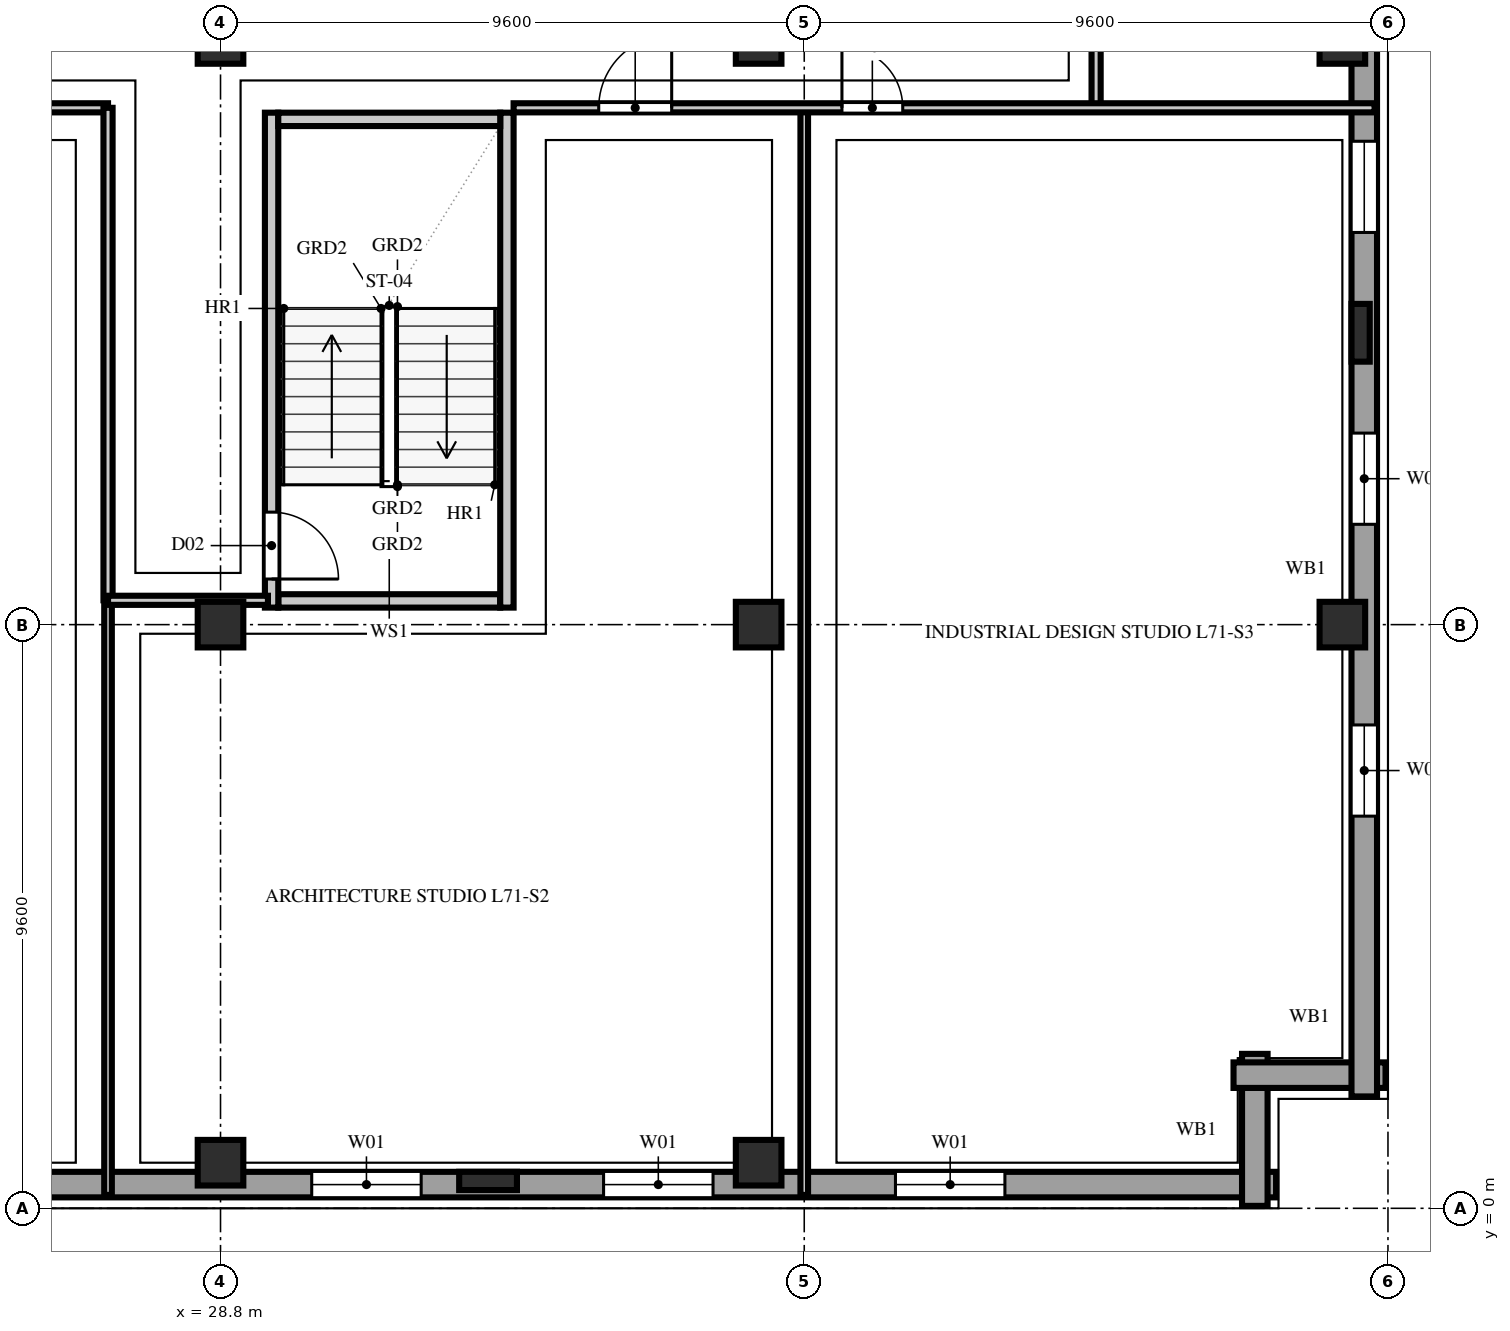
"""IFC4 building model, lengths in metres.
Left out: names, types, materials, properties, quantities, classifications, styles, units other than length and angle.
Written with IfcOpenShell. Run it as: python <this file> out.ifc"""

import sys

from ifc_helpers import new_model, si_unit, direction, frame, frame_2d, origin, origin_2d, place, context, subcontext, project, spatial, rectangle, extrude, element, fill, save


model = new_model("IFC4")
c1 = context("Model", 3, precision=1e-05, world=origin(), true_north=direction((0.0, 1.0)))
c2 = subcontext(c1, "Body", "Model", "MODEL_VIEW")
j1 = project(units=[si_unit("LENGTHUNIT", "METRE"), si_unit("PLANEANGLEUNIT", "RADIAN")], contexts=[c1])
p1 = place(None, origin())
s1 = spatial("IfcSite", under=j1, at=p1, CompositionType="ELEMENT")
p2 = place(p1, origin())
s2 = spatial("IfcBuilding", under=s1, at=p2, CompositionType="ELEMENT")
p3 = place(p2, frame((0.0, 0.0, 281.0)))
s3 = spatial("IfcBuildingStorey", under=s2, at=p3, CompositionType="ELEMENT", Elevation=281.0)
for number, where, z_axis, x_axis in (
    (1, (28.8, 0.75, 0.0), (0.0, 0.0, 1.0), (1.0, 0.0, 0.0)),
    (2, (28.8, 9.6, 0.0), (0.0, 0.0, 1.0), (1.0, 0.0, 0.0)),
    (3, (28.8, 19.2, 0.0), (0.0, 0.0, 1.0), (1.0, 0.0, 0.0)),
    (4, (37.65, 0.75, 0.0), (0.0, 0.0, 1.0), (1.0, 0.0, 0.0)),
    (5, (37.65, 9.6, 0.0), (0.0, 0.0, 1.0), (1.0, 0.0, 0.0)),
    (6, (37.65, 19.2, 0.0), (0.0, 0.0, 1.0), (1.0, 0.0, 0.0)),
    (7, (47.25, 9.6, 0.0), (0.0, 0.0, 1.0), (1.0, 0.0, 0.0)),
    (8, (47.25, 19.2, 0.0), (0.0, 0.0, 1.0), (1.0, 0.0, 0.0)),
):
    element("IfcColumn", number, at=place(p3, frame(where, z_axis=z_axis, x_axis=x_axis)), inside=s3, PredefinedType="COLUMN", context=c2, shape_type="SweptSolid", body=[
        extrude(rectangle(XDim=0.75, YDim=0.75, at=origin_2d()), origin(), (0.0, 0.0, 1.0), 3.8),
    ])
for number, where, z_axis, x_axis in (
    (9, (33.2, 0.45, 0.0), (0.0, 0.0, 1.0), (1.0, 0.0, 0.0)),
    (10, (47.55, 14.4, 0.0), (0.0, 0.0, 1.0), (0.0, 1.0, 0.0)),
):
    element("IfcColumn", number, at=place(p3, frame(where, z_axis=z_axis, x_axis=x_axis)), inside=s3, PredefinedType="PILASTER", context=c2, shape_type="SweptSolid", body=[
        extrude(rectangle(XDim=0.95, YDim=0.3, at=origin_2d()), origin(), (0.0, 0.0, 1.0), 3.8),
    ])
p4 = place(p3, frame((1.84, 0.39, 0.0), z_axis=(0.0, 0.0, 1.0), x_axis=(1.0, 0.0, 0.0)))
e11 = element("IfcWall", 11, at=p4, inside=s3, PredefinedType="SOLIDWALL", context=c2, shape_type="SweptSolid", body=[
    extrude(rectangle(XDim=44.32, YDim=0.42, at=frame_2d((22.16, 0.0))), origin(), (0.0, 0.0, 1.0), 3.54),
])
p5 = place(p4, frame((4.46, 0.0, 0.85)))
e12 = element("IfcOpeningElement", 12, at=p5, cuts=e11, PredefinedType="OPENING", context=c2, shape_type="SweptSolid", body=[
    extrude(rectangle(XDim=1.8, YDim=1.85, at=frame_2d((0.9, 0.925))), frame((0.0, 0.222, 0.0), z_axis=(0.0, -1.0, 0.0), x_axis=(1.0, 0.0, 0.0)), (0.0, 0.0, 1.0), 0.444),
])
p6 = place(p4, frame((9.26, 0.0, 0.85)))
e13 = element("IfcOpeningElement", 13, at=p6, cuts=e11, PredefinedType="OPENING", context=c2, shape_type="SweptSolid", body=[
    extrude(rectangle(XDim=1.8, YDim=1.85, at=frame_2d((0.9, 0.925))), frame((0.0, 0.222, 0.0), z_axis=(0.0, -1.0, 0.0), x_axis=(1.0, 0.0, 0.0)), (0.0, 0.0, 1.0), 0.444),
])
p7 = place(p4, frame((18.86, 0.0, 0.85)))
e14 = element("IfcOpeningElement", 14, at=p7, cuts=e11, PredefinedType="OPENING", context=c2, shape_type="SweptSolid", body=[
    extrude(rectangle(XDim=1.8, YDim=1.85, at=frame_2d((0.9, 0.925))), frame((0.0, 0.222, 0.0), z_axis=(0.0, -1.0, 0.0), x_axis=(1.0, 0.0, 0.0)), (0.0, 0.0, 1.0), 0.444),
])
p8 = place(p4, frame((28.46, 0.0, 0.85)))
e15 = element("IfcOpeningElement", 15, at=p8, cuts=e11, PredefinedType="OPENING", context=c2, shape_type="SweptSolid", body=[
    extrude(rectangle(XDim=1.8, YDim=1.85, at=frame_2d((0.9, 0.925))), frame((0.0, 0.222, 0.0), z_axis=(0.0, -1.0, 0.0), x_axis=(1.0, 0.0, 0.0)), (0.0, 0.0, 1.0), 0.444),
])
p9 = place(p4, frame((33.26, 0.0, 0.85)))
e16 = element("IfcOpeningElement", 16, at=p9, cuts=e11, PredefinedType="OPENING", context=c2, shape_type="SweptSolid", body=[
    extrude(rectangle(XDim=1.8, YDim=1.85, at=frame_2d((0.9, 0.925))), frame((0.0, 0.222, 0.0), z_axis=(0.0, -1.0, 0.0), x_axis=(1.0, 0.0, 0.0)), (0.0, 0.0, 1.0), 0.444),
])
p10 = place(p4, frame((38.06, 0.0, 0.85)))
e17 = element("IfcOpeningElement", 17, at=p10, cuts=e11, PredefinedType="OPENING", context=c2, shape_type="SweptSolid", body=[
    extrude(rectangle(XDim=1.8, YDim=1.85, at=frame_2d((0.9, 0.925))), frame((0.0, 0.222, 0.0), z_axis=(0.0, -1.0, 0.0), x_axis=(1.0, 0.0, 0.0)), (0.0, 0.0, 1.0), 0.444),
])
for number, where, z_axis, x_axis in (
    (18, (45.81, 0.04, 0.0), (0.0, 0.0, 1.0), (0.0, 1.0, 0.0)),
    (19, (45.46, 2.19, 0.0), (0.0, 0.0, 1.0), (1.0, 0.0, 0.0)),
):
    element("IfcWall", number, at=place(p3, frame(where, z_axis=z_axis, x_axis=x_axis)), inside=s3, PredefinedType="SOLIDWALL", context=c2, shape_type="SweptSolid", body=[
        extrude(rectangle(XDim=2.5, YDim=0.42, at=frame_2d((1.25, 0.0))), origin(), (0.0, 0.0, 1.0), 3.54),
    ])
p11 = place(p3, frame((47.61, 1.84, 0.0), z_axis=(0.0, 0.0, 1.0), x_axis=(0.0, 1.0, 0.0)))
e20 = element("IfcWall", 20, at=p11, inside=s3, PredefinedType="SOLIDWALL", context=c2, shape_type="SweptSolid", body=[
    extrude(rectangle(XDim=17.36, YDim=0.42, at=frame_2d((8.68, 0.0))), origin(), (0.0, 0.0, 1.0), 3.54),
])
p12 = place(p11, frame((4.61, 0.0, 0.85)))
e21 = element("IfcOpeningElement", 21, at=p12, cuts=e20, PredefinedType="OPENING", context=c2, shape_type="SweptSolid", body=[
    extrude(rectangle(XDim=1.5, YDim=1.85, at=frame_2d((0.75, 0.925))), frame((0.0, 0.222, 0.0), z_axis=(0.0, -1.0, 0.0), x_axis=(1.0, 0.0, 0.0)), (0.0, 0.0, 1.0), 0.444),
])
p13 = place(p11, frame((9.41, 0.0, 0.85)))
e22 = element("IfcOpeningElement", 22, at=p13, cuts=e20, PredefinedType="OPENING", context=c2, shape_type="SweptSolid", body=[
    extrude(rectangle(XDim=1.5, YDim=1.85, at=frame_2d((0.75, 0.925))), frame((0.0, 0.222, 0.0), z_axis=(0.0, -1.0, 0.0), x_axis=(1.0, 0.0, 0.0)), (0.0, 0.0, 1.0), 0.444),
])
p14 = place(p11, frame((14.21, 0.0, 0.85)))
e23 = element("IfcOpeningElement", 23, at=p14, cuts=e20, PredefinedType="OPENING", context=c2, shape_type="SweptSolid", body=[
    extrude(rectangle(XDim=1.5, YDim=1.85, at=frame_2d((0.75, 0.925))), frame((0.0, 0.222, 0.0), z_axis=(0.0, -1.0, 0.0), x_axis=(1.0, 0.0, 0.0)), (0.0, 0.0, 1.0), 0.444),
])
p15 = place(p3, frame((29.75, 9.99, 0.0), z_axis=(0.0, 0.0, 1.0), x_axis=(1.0, 0.0, 0.0)))
e24 = element("IfcWall", 24, at=p15, inside=s3, PredefinedType="SOLIDWALL", context=c2, shape_type="SweptSolid", body=[
    extrude(rectangle(XDim=3.65, YDim=0.22, at=frame_2d((1.825, 0.0))), origin(), (0.0, 0.0, 1.0), 3.54),
])
p16 = place(p3, frame((29.64, 9.88, 0.0), z_axis=(0.0, 0.0, 1.0), x_axis=(0.0, 1.0, 0.0)))
e25 = element("IfcWall", 25, at=p16, inside=s3, PredefinedType="SOLIDWALL", context=c2, shape_type="SweptSolid", body=[
    extrude(rectangle(XDim=8.14, YDim=0.22, at=frame_2d((4.07, 0.0))), origin(), (0.0, 0.0, 1.0), 3.54),
])
p17 = place(p16, frame((0.47, 0.0, 0.0)))
e26 = element("IfcOpeningElement", 26, at=p17, cuts=e25, PredefinedType="OPENING", context=c2, shape_type="SweptSolid", body=[
    extrude(rectangle(XDim=1.1, YDim=2.2, at=frame_2d((0.55, 1.1))), frame((0.0, 0.122, 0.0), z_axis=(0.0, -1.0, 0.0), x_axis=(1.0, 0.0, 0.0)), (0.0, 0.0, 1.0), 0.244),
])
p18 = place(p3, frame((33.51, 9.88, 0.0), z_axis=(0.0, 0.0, 1.0), x_axis=(0.0, 1.0, 0.0)))
e27 = element("IfcWall", 27, at=p18, inside=s3, PredefinedType="SOLIDWALL", context=c2, shape_type="SweptSolid", body=[
    extrude(rectangle(XDim=8.14, YDim=0.22, at=frame_2d((4.07, 0.0))), origin(), (0.0, 0.0, 1.0), 3.54),
])
p19 = place(p3, frame((29.75, 17.91, 0.0), z_axis=(0.0, 0.0, 1.0), x_axis=(1.0, 0.0, 0.0)))
e28 = element("IfcWall", 28, at=p19, inside=s3, PredefinedType="SOLIDWALL", context=c2, shape_type="SweptSolid", body=[
    extrude(rectangle(XDim=3.65, YDim=0.22, at=frame_2d((1.825, 0.0))), origin(), (0.0, 0.0, 1.0), 3.54),
])
p20 = place(p3, frame((43.2, 18.1, 0.0), z_axis=(0.0, 0.0, 1.0), x_axis=(0.0, 1.0, 0.0)))
e29 = element("IfcWall", 29, at=p20, inside=s3, PredefinedType="PARTITIONING", context=c2, shape_type="SweptSolid", body=[
    extrude(rectangle(XDim=2.85, YDim=0.15, at=frame_2d((1.425, 0.0))), origin(), (0.0, 0.0, 1.0), 3.54),
])
p21 = place(p3, frame((19.2, 18.1, 0.0), z_axis=(0.0, 0.0, 1.0), x_axis=(1.0, 0.0, 0.0)))
e30 = element("IfcWall", 30, at=p21, inside=s3, PredefinedType="PARTITIONING", context=c2, shape_type="SweptSolid", body=[
    extrude(rectangle(XDim=7.75, YDim=0.15, at=frame_2d((3.875, 0.0))), origin(), (0.0, 0.0, 1.0), 3.54),
])
p22 = place(p21, frame((2.8, 0.0, 0.0)))
e31 = element("IfcOpeningElement", 31, at=p22, cuts=e30, PredefinedType="OPENING", context=c2, shape_type="SweptSolid", body=[
    extrude(rectangle(XDim=1.0, YDim=2.2, at=frame_2d((0.5, 1.1))), frame((0.0, 0.087, 0.0), z_axis=(0.0, -1.0, 0.0), x_axis=(1.0, 0.0, 0.0)), (0.0, 0.0, 1.0), 0.174),
])
p23 = place(p3, frame((26.95, 0.22, 0.0), z_axis=(0.0, 0.0, 1.0), x_axis=(0.0, 1.0, 0.0)))
e32 = element("IfcWall", 32, at=p23, inside=s3, PredefinedType="PARTITIONING", context=c2, shape_type="SweptSolid", body=[
    extrude(rectangle(XDim=9.78, YDim=0.125, at=frame_2d((4.89, 0.0))), origin(), (0.0, 0.0, 1.0), 3.54),
])
p24 = place(p3, frame((26.95, 10.0, 0.0), z_axis=(0.0, 0.0, 1.0), x_axis=(0.0, 1.0, 0.0)))
e33 = element("IfcWall", 33, at=p24, inside=s3, PredefinedType="PARTITIONING", context=c2, shape_type="SweptSolid", body=[
    extrude(rectangle(XDim=8.1, YDim=0.15, at=frame_2d((4.05, 0.0))), origin(), (0.0, 0.0, 1.0), 3.54),
])
p25 = place(p3, frame((26.95, 10.0, 0.0), z_axis=(0.0, 0.0, 1.0), x_axis=(1.0, 0.0, 0.0)))
e34 = element("IfcWall", 34, at=p25, inside=s3, PredefinedType="PARTITIONING", context=c2, shape_type="SweptSolid", body=[
    extrude(rectangle(XDim=2.63, YDim=0.15, at=frame_2d((1.315, 0.0))), origin(), (0.0, 0.0, 1.0), 3.54),
])
p26 = place(p3, frame((38.4, 0.22, 0.0), z_axis=(0.0, 0.0, 1.0), x_axis=(0.0, 1.0, 0.0)))
e35 = element("IfcWall", 35, at=p26, inside=s3, PredefinedType="PARTITIONING", context=c2, shape_type="SweptSolid", body=[
    extrude(rectangle(XDim=17.88, YDim=0.125, at=frame_2d((8.94, 0.0))), origin(), (0.0, 0.0, 1.0), 3.54),
])
p27 = place(p3, frame((33.62, 18.1, 0.0), z_axis=(0.0, 0.0, 1.0), x_axis=(1.0, 0.0, 0.0)))
e36 = element("IfcWall", 36, at=p27, inside=s3, PredefinedType="PARTITIONING", context=c2, shape_type="SweptSolid", body=[
    extrude(rectangle(XDim=14.16, YDim=0.15, at=frame_2d((7.08, 0.0))), origin(), (0.0, 0.0, 1.0), 3.54),
])
p28 = place(p27, frame((1.4, 0.0, 0.0)))
e37 = element("IfcOpeningElement", 37, at=p28, cuts=e36, PredefinedType="OPENING", context=c2, shape_type="SweptSolid", body=[
    extrude(rectangle(XDim=1.2, YDim=2.2, at=frame_2d((0.6, 1.1))), frame((0.0, 0.087, 0.0), z_axis=(0.0, -1.0, 0.0), x_axis=(1.0, 0.0, 0.0)), (0.0, 0.0, 1.0), 0.174),
])
p29 = place(p27, frame((5.4, 0.0, 0.0)))
e38 = element("IfcOpeningElement", 38, at=p29, cuts=e36, PredefinedType="OPENING", context=c2, shape_type="SweptSolid", body=[
    extrude(rectangle(XDim=1.0, YDim=2.2, at=frame_2d((0.5, 1.1))), frame((0.0, 0.087, 0.0), z_axis=(0.0, -1.0, 0.0), x_axis=(1.0, 0.0, 0.0)), (0.0, 0.0, 1.0), 0.174),
])
p30 = place(p8, origin())
e39 = element("IfcWindow", 39, at=p30, inside=s3, PartitioningType="DOUBLE_PANEL_VERTICAL", PredefinedType="WINDOW", context=c2, shape_type="SweptSolid", body=[
    extrude(rectangle(XDim=1.8, YDim=1.85, at=frame_2d((0.9, 0.925))), frame((0.0, 0.11, 0.0), z_axis=(0.0, -1.0, 0.0), x_axis=(1.0, 0.0, 0.0)), (0.0, 0.0, 1.0), 0.06),
])
fill(e15, e39)
p31 = place(p9, origin())
e40 = element("IfcWindow", 40, at=p31, inside=s3, PartitioningType="DOUBLE_PANEL_VERTICAL", PredefinedType="WINDOW", context=c2, shape_type="SweptSolid", body=[
    extrude(rectangle(XDim=1.8, YDim=1.85, at=frame_2d((0.9, 0.925))), frame((0.0, 0.11, 0.0), z_axis=(0.0, -1.0, 0.0), x_axis=(1.0, 0.0, 0.0)), (0.0, 0.0, 1.0), 0.06),
])
fill(e16, e40)
p32 = place(p10, origin())
e41 = element("IfcWindow", 41, at=p32, inside=s3, PartitioningType="DOUBLE_PANEL_VERTICAL", PredefinedType="WINDOW", context=c2, shape_type="SweptSolid", body=[
    extrude(rectangle(XDim=1.8, YDim=1.85, at=frame_2d((0.9, 0.925))), frame((0.0, 0.11, 0.0), z_axis=(0.0, -1.0, 0.0), x_axis=(1.0, 0.0, 0.0)), (0.0, 0.0, 1.0), 0.06),
])
fill(e17, e41)
p33 = place(p12, origin())
e42 = element("IfcWindow", 42, at=p33, inside=s3, PartitioningType="DOUBLE_PANEL_VERTICAL", PredefinedType="WINDOW", context=c2, shape_type="SweptSolid", body=[
    extrude(rectangle(XDim=1.5, YDim=1.85, at=frame_2d((0.75, 0.925))), frame((0.0, 0.11, 0.0), z_axis=(0.0, -1.0, 0.0), x_axis=(1.0, 0.0, 0.0)), (0.0, 0.0, 1.0), 0.06),
])
fill(e21, e42)
p34 = place(p13, origin())
e43 = element("IfcWindow", 43, at=p34, inside=s3, PartitioningType="DOUBLE_PANEL_VERTICAL", PredefinedType="WINDOW", context=c2, shape_type="SweptSolid", body=[
    extrude(rectangle(XDim=1.5, YDim=1.85, at=frame_2d((0.75, 0.925))), frame((0.0, 0.11, 0.0), z_axis=(0.0, -1.0, 0.0), x_axis=(1.0, 0.0, 0.0)), (0.0, 0.0, 1.0), 0.06),
])
fill(e22, e43)
p35 = place(p14, origin())
e44 = element("IfcWindow", 44, at=p35, inside=s3, PartitioningType="DOUBLE_PANEL_VERTICAL", PredefinedType="WINDOW", context=c2, shape_type="SweptSolid", body=[
    extrude(rectangle(XDim=1.5, YDim=1.85, at=frame_2d((0.75, 0.925))), frame((0.0, 0.11, 0.0), z_axis=(0.0, -1.0, 0.0), x_axis=(1.0, 0.0, 0.0)), (0.0, 0.0, 1.0), 0.06),
])
fill(e23, e44)
p36 = place(p17, frame((1.1, 0.0, 0.0), z_axis=(0.0, 0.0, 1.0), x_axis=(-1.0, 0.0, 0.0)))
e45 = element("IfcDoor", 45, at=p36, inside=s3, OperationType="SINGLE_SWING_RIGHT", PredefinedType="DOOR", context=c2, shape_type="SweptSolid", body=[
    extrude(rectangle(XDim=1.1, YDim=2.2, at=frame_2d((0.55, 1.1))), frame((0.0, 0.025, 0.0), z_axis=(0.0, -1.0, 0.0), x_axis=(1.0, 0.0, 0.0)), (0.0, 0.0, 1.0), 0.05),
])
fill(e26, e45)
p37 = place(p28, origin())
e46 = element("IfcDoor", 46, at=p37, inside=s3, OperationType="SINGLE_SWING_RIGHT", PredefinedType="DOOR", context=c2, shape_type="SweptSolid", body=[
    extrude(rectangle(XDim=1.2, YDim=2.2, at=frame_2d((0.6, 1.1))), frame((0.0, 0.025, 0.0), z_axis=(0.0, -1.0, 0.0), x_axis=(1.0, 0.0, 0.0)), (0.0, 0.0, 1.0), 0.05),
])
fill(e37, e46)
p38 = place(p29, origin())
e47 = element("IfcDoor", 47, at=p38, inside=s3, OperationType="SINGLE_SWING_LEFT", PredefinedType="DOOR", context=c2, shape_type="SweptSolid", body=[
    extrude(rectangle(XDim=1.0, YDim=2.2, at=frame_2d((0.5, 1.1))), frame((0.0, 0.025, 0.0), z_axis=(0.0, -1.0, 0.0), x_axis=(1.0, 0.0, 0.0)), (0.0, 0.0, 1.0), 0.05),
])
fill(e38, e47)
save(model, sys.argv[1])
